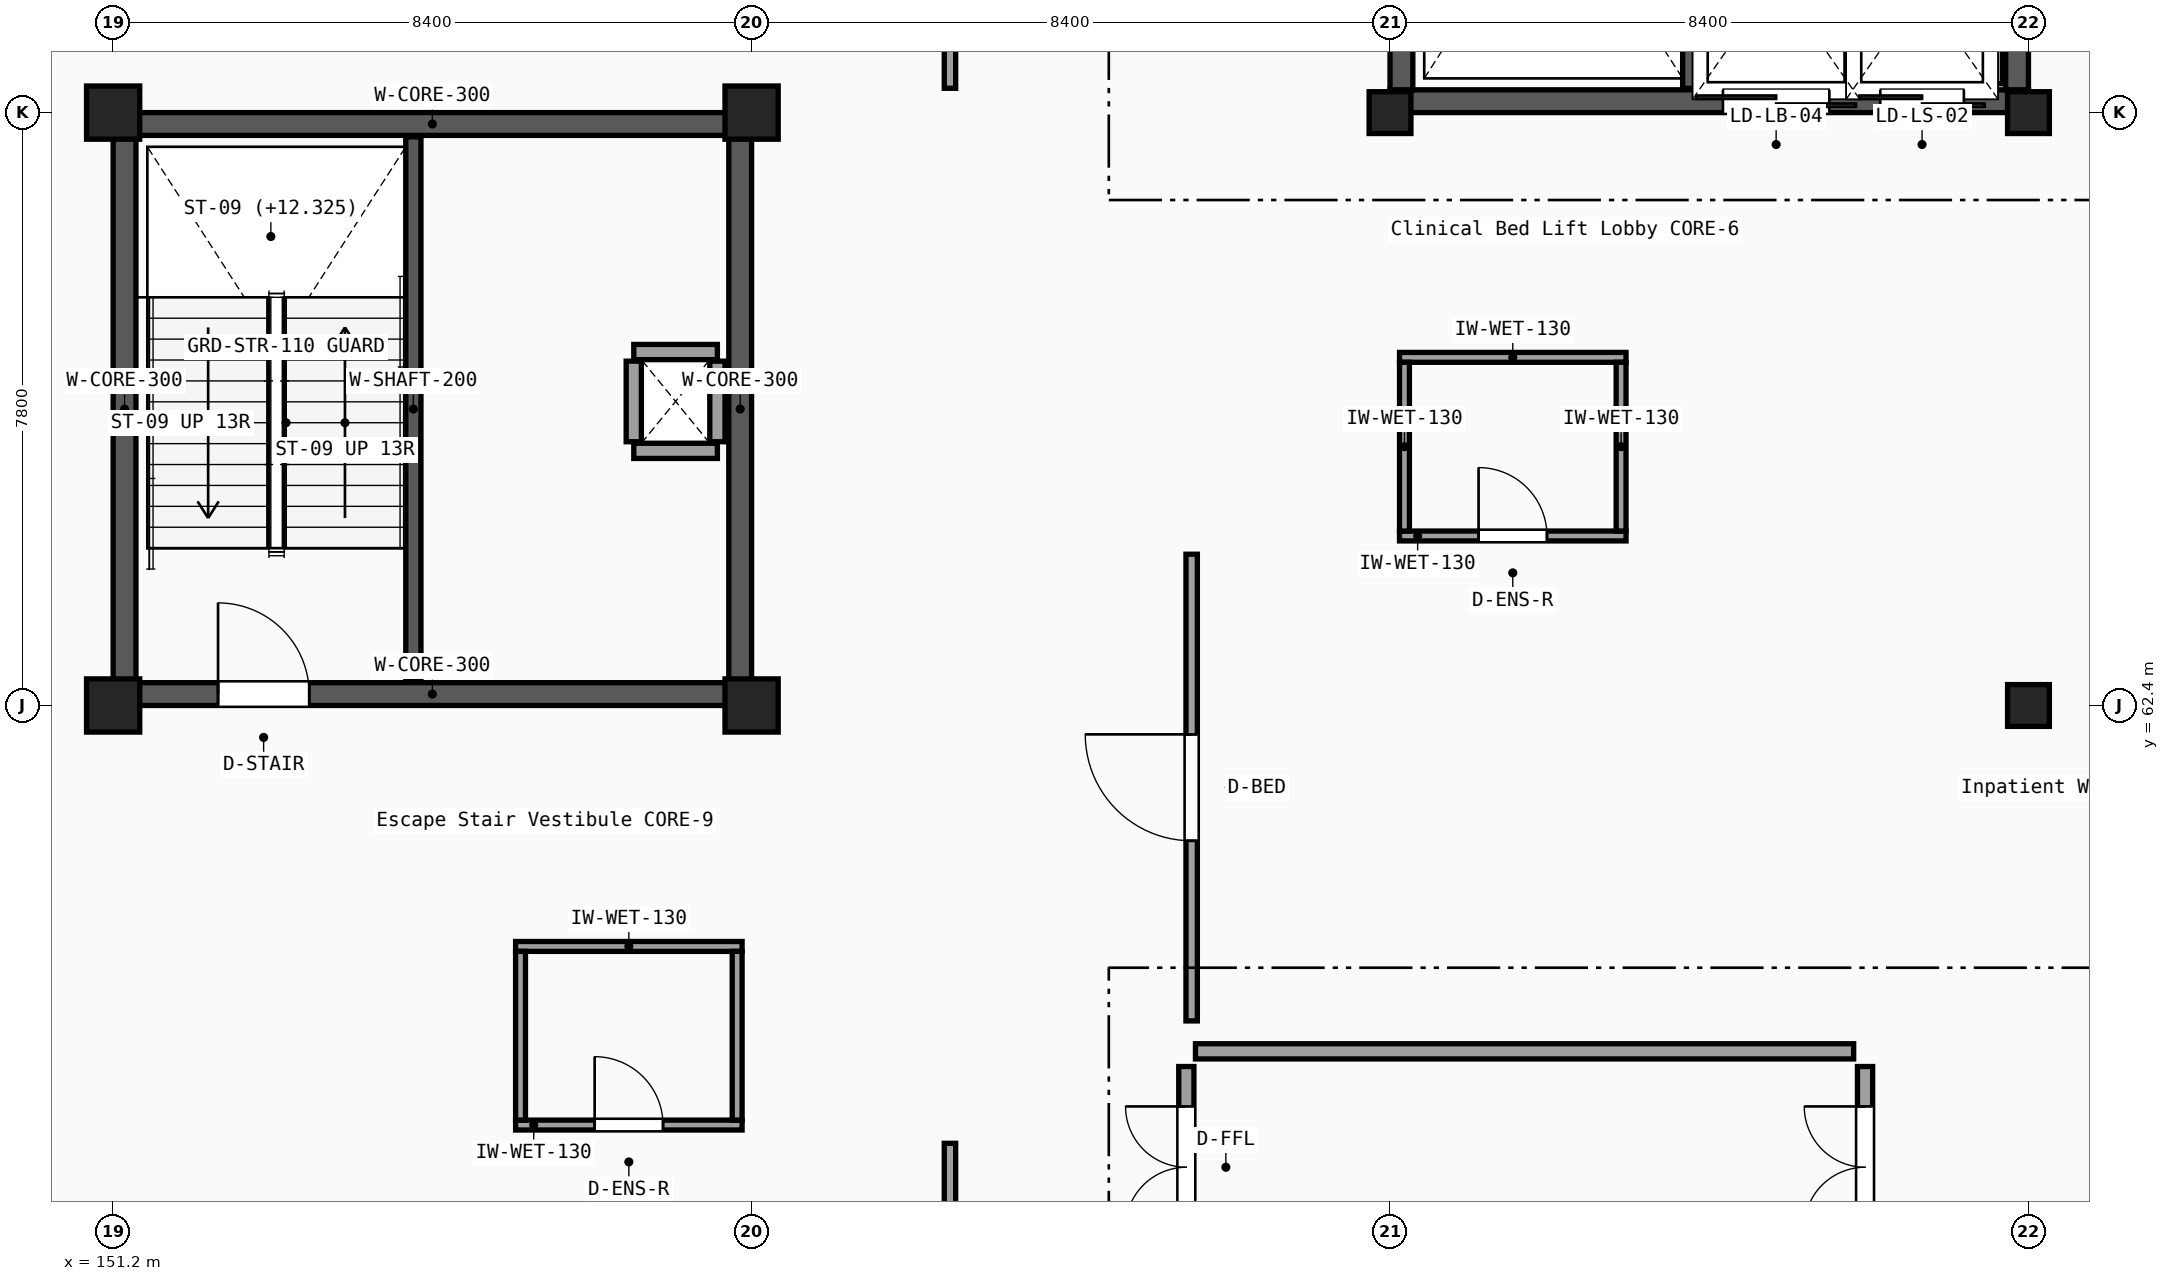
"""IFC4 building model, lengths in metres.
Left out: names, types, materials, properties, quantities, classifications, styles, units other than length and angle.
Written with IfcOpenShell. Run it as: python <this file> out.ifc"""

import sys

from ifc_helpers import new_model, si_unit, direction, frame, frame_2d, origin, origin_2d, place, context, subcontext, project, spatial, rectangle, i_section, extrude, element, fill, save


model = new_model("IFC4")
c1 = context("Model", 3, precision=1e-05, world=origin(), true_north=direction((0.0, 1.0)))
c2 = subcontext(c1, "Body", "Model", "MODEL_VIEW")
j1 = project(units=[si_unit("LENGTHUNIT", "METRE"), si_unit("PLANEANGLEUNIT", "RADIAN")], contexts=[c1])
p1 = place(None, origin())
s1 = spatial("IfcSite", under=j1, at=p1, CompositionType="ELEMENT")
p2 = place(p1, origin())
s2 = spatial("IfcBuilding", under=s1, at=p2, CompositionType="ELEMENT")
p3 = place(p2, frame((0.0, 0.0, 10.2)))
s3 = spatial("IfcBuildingStorey", under=s2, at=p3, CompositionType="ELEMENT", Elevation=10.2)
for number, where, z_axis, x_axis in (
    (1, (151.2, 62.4, 0.0), (0.0, 0.0, 1.0), (1.0, 0.0, 0.0)),
    (2, (151.2, 70.2, 0.0), (0.0, 0.0, 1.0), (1.0, 0.0, 0.0)),
    (3, (159.6, 62.4, 0.0), (0.0, 0.0, 1.0), (1.0, 0.0, 0.0)),
    (4, (159.6, 70.2, 0.0), (0.0, 0.0, 1.0), (1.0, 0.0, 0.0)),
):
    element("IfcColumn", number, at=place(p3, frame(where, z_axis=z_axis, x_axis=x_axis)), inside=s3, PredefinedType="COLUMN", context=c2, shape_type="SweptSolid", body=[
        extrude(rectangle(XDim=0.7, YDim=0.7, at=origin_2d()), origin(), (0.0, 0.0, 1.0), 4.65),
    ])
for number, where, z_axis, x_axis in (
    (5, (168.0, 70.2, 0.0), (0.0, 0.0, 1.0), (1.0, 0.0, 0.0)),
    (6, (176.4, 62.4, 0.0), (0.0, 0.0, 1.0), (1.0, 0.0, 0.0)),
    (7, (176.4, 70.2, 0.0), (0.0, 0.0, 1.0), (1.0, 0.0, 0.0)),
):
    element("IfcColumn", number, at=place(p3, frame(where, z_axis=z_axis, x_axis=x_axis)), inside=s3, PredefinedType="COLUMN", context=c2, shape_type="SweptSolid", body=[
        extrude(i_section(OverallWidth=0.3, OverallDepth=0.55, WebThickness=0.015, FlangeThickness=0.029, FilletRadius=0.027, at=origin_2d()), origin(), (0.0, 0.0, 1.0), 4.65),
    ])
p4 = place(p3, frame((165.44, 57.85, 0.0), z_axis=(0.0, 0.0, 1.0), x_axis=(1.0, 0.0, 0.0)))
e8 = element("IfcWall", 8, at=p4, inside=s3, PredefinedType="PARTITIONING", context=c2, shape_type="SweptSolid", body=[
    extrude(rectangle(XDim=8.66, YDim=0.2, at=frame_2d((4.33, 0.0))), origin(), (0.0, 0.0, 1.0), 3.95),
])
p5 = place(p3, frame((165.32, 55.0, 0.0), z_axis=(0.0, 0.0, 1.0), x_axis=(0.0, 1.0, 0.0)))
e9 = element("IfcWall", 9, at=p5, inside=s3, PredefinedType="PARTITIONING", context=c2, shape_type="SweptSolid", body=[
    extrude(rectangle(XDim=2.65, YDim=0.2, at=frame_2d((1.325, 0.0))), origin(), (0.0, 0.0, 1.0), 3.95),
])
p6 = place(p5, frame((0.525, 0.0, 0.0)))
e10 = element("IfcOpeningElement", 10, at=p6, cuts=e9, PredefinedType="OPENING", context=c2, shape_type="SweptSolid", body=[
    extrude(rectangle(XDim=1.6, YDim=2.2, at=frame_2d((0.8, 1.1))), frame((0.0, 0.11, 0.0), z_axis=(0.0, -1.0, 0.0), x_axis=(1.0, 0.0, 0.0)), (0.0, 0.0, 1.0), 0.22),
])
p7 = place(p3, frame((174.25, 55.0, 0.0), z_axis=(0.0, 0.0, 1.0), x_axis=(0.0, 1.0, 0.0)))
e11 = element("IfcWall", 11, at=p7, inside=s3, PredefinedType="PARTITIONING", context=c2, shape_type="SweptSolid", body=[
    extrude(rectangle(XDim=2.65, YDim=0.2, at=frame_2d((1.325, 0.0))), origin(), (0.0, 0.0, 1.0), 3.95),
])
p8 = place(p7, frame((0.525, 0.0, 0.0)))
e12 = element("IfcOpeningElement", 12, at=p8, cuts=e11, PredefinedType="OPENING", context=c2, shape_type="SweptSolid", body=[
    extrude(rectangle(XDim=1.6, YDim=2.2, at=frame_2d((0.8, 1.1))), frame((0.0, 0.11, 0.0), z_axis=(0.0, -1.0, 0.0), x_axis=(1.0, 0.0, 0.0)), (0.0, 0.0, 1.0), 0.22),
])
p9 = place(p3, frame((168.0, 70.35, 0.0), z_axis=(0.0, 0.0, 1.0), x_axis=(1.0, 0.0, 0.0)))
e13 = element("IfcWall", 13, at=p9, inside=s3, PredefinedType="SHEAR", context=c2, shape_type="SweptSolid", body=[
    extrude(rectangle(XDim=8.4, YDim=0.3, at=frame_2d((4.2, 0.0))), origin(), (0.0, 0.0, 1.0), 4.41),
])
p10 = place(p9, frame((4.38, 0.0, 0.0)))
e14 = element("IfcOpeningElement", 14, at=p10, cuts=e13, PredefinedType="OPENING", context=c2, shape_type="SweptSolid", body=[
    extrude(rectangle(XDim=1.4, YDim=2.2, at=frame_2d((0.7, 1.1))), frame((0.0, 0.16, 0.0), z_axis=(0.0, -1.0, 0.0), x_axis=(1.0, 0.0, 0.0)), (0.0, 0.0, 1.0), 0.32),
])
p11 = place(p9, frame((6.45, 0.0, 0.0)))
e15 = element("IfcOpeningElement", 15, at=p11, cuts=e13, PredefinedType="OPENING", context=c2, shape_type="SweptSolid", body=[
    extrude(rectangle(XDim=1.1, YDim=2.15, at=frame_2d((0.55, 1.075))), frame((0.0, 0.16, 0.0), z_axis=(0.0, -1.0, 0.0), x_axis=(1.0, 0.0, 0.0)), (0.0, 0.0, 1.0), 0.32),
])
for number, where, z_axis, x_axis in (
    (16, (168.15, 70.5, 0.0), (0.0, 0.0, 1.0), (0.0, 1.0, 0.0)),
    (17, (176.25, 70.5, 0.0), (0.0, 0.0, 1.0), (0.0, 1.0, 0.0)),
):
    element("IfcWall", number, at=place(p3, frame(where, z_axis=z_axis, x_axis=x_axis)), inside=s3, PredefinedType="SHEAR", context=c2, shape_type="SweptSolid", body=[
        extrude(rectangle(XDim=7.2, YDim=0.3, at=frame_2d((3.6, 0.0))), origin(), (0.0, 0.0, 1.0), 4.41),
    ])
p12 = place(p3, frame((171.95, 70.52, 0.0), z_axis=(0.0, 0.0, 1.0), x_axis=(0.0, 1.0, 0.0)))
e18 = element("IfcWall", 18, at=p12, inside=s3, PredefinedType="SHEAR", context=c2, shape_type="SweptSolid", body=[
    extrude(rectangle(XDim=7.16, YDim=0.2, at=frame_2d((3.58, 0.0))), origin(), (0.0, 0.0, 1.0), 4.41),
])
p13 = place(p3, frame((174.14, 70.58, 0.0), z_axis=(0.0, 0.0, 1.0), x_axis=(0.0, 1.0, 0.0)))
e19 = element("IfcWall", 19, at=p13, inside=s3, PredefinedType="PARTITIONING", context=c2, shape_type="SweptSolid", body=[
    extrude(rectangle(XDim=2.74, YDim=0.2, at=frame_2d((1.37, 0.0))), origin(), (0.0, 0.0, 1.0), 3.95),
])
p14 = place(p3, frame((175.96, 70.58, 0.0), z_axis=(0.0, 0.0, 1.0), x_axis=(0.0, 1.0, 0.0)))
e20 = element("IfcWall", 20, at=p14, inside=s3, PredefinedType="PARTITIONING", context=c2, shape_type="SweptSolid", body=[
    extrude(rectangle(XDim=2.44, YDim=0.2, at=frame_2d((1.22, 0.0))), origin(), (0.0, 0.0, 1.0), 3.95),
])
p15 = place(p3, frame((151.2, 62.55, 0.0), z_axis=(0.0, 0.0, 1.0), x_axis=(1.0, 0.0, 0.0)))
e21 = element("IfcWall", 21, at=p15, inside=s3, PredefinedType="SHEAR", context=c2, shape_type="SweptSolid", body=[
    extrude(rectangle(XDim=8.4, YDim=0.3, at=frame_2d((4.2, 0.0))), origin(), (0.0, 0.0, 1.0), 4.41),
])
p16 = place(p15, frame((1.38, 0.0, 0.0)))
e22 = element("IfcOpeningElement", 22, at=p16, cuts=e21, PredefinedType="OPENING", context=c2, shape_type="SweptSolid", body=[
    extrude(rectangle(XDim=1.2, YDim=2.15, at=frame_2d((0.6, 1.075))), frame((0.0, 0.16, 0.0), z_axis=(0.0, -1.0, 0.0), x_axis=(1.0, 0.0, 0.0)), (0.0, 0.0, 1.0), 0.32),
])
p17 = place(p3, frame((151.2, 70.05, 0.0), z_axis=(0.0, 0.0, 1.0), x_axis=(1.0, 0.0, 0.0)))
e23 = element("IfcWall", 23, at=p17, inside=s3, PredefinedType="SHEAR", context=c2, shape_type="SweptSolid", body=[
    extrude(rectangle(XDim=8.4, YDim=0.3, at=frame_2d((4.2, 0.0))), origin(), (0.0, 0.0, 1.0), 4.41),
])
for number, where, z_axis, x_axis in (
    (24, (151.35, 62.7, 0.0), (0.0, 0.0, 1.0), (0.0, 1.0, 0.0)),
    (25, (159.45, 62.7, 0.0), (0.0, 0.0, 1.0), (0.0, 1.0, 0.0)),
):
    element("IfcWall", number, at=place(p3, frame(where, z_axis=z_axis, x_axis=x_axis)), inside=s3, PredefinedType="SHEAR", context=c2, shape_type="SweptSolid", body=[
        extrude(rectangle(XDim=7.2, YDim=0.3, at=frame_2d((3.6, 0.0))), origin(), (0.0, 0.0, 1.0), 4.41),
    ])
p18 = place(p3, frame((155.15, 62.72, 0.0), z_axis=(0.0, 0.0, 1.0), x_axis=(0.0, 1.0, 0.0)))
e26 = element("IfcWall", 26, at=p18, inside=s3, PredefinedType="SHEAR", context=c2, shape_type="SweptSolid", body=[
    extrude(rectangle(XDim=7.16, YDim=0.2, at=frame_2d((3.58, 0.0))), origin(), (0.0, 0.0, 1.0), 4.41),
])
for number, where, z_axis, x_axis in (
    (27, (158.05, 65.75, 0.0), (0.0, 0.0, 1.0), (1.0, 0.0, 0.0)),
    (28, (158.05, 67.05, 0.0), (0.0, 0.0, 1.0), (1.0, 0.0, 0.0)),
):
    element("IfcWall", number, at=place(p3, frame(where, z_axis=z_axis, x_axis=x_axis)), inside=s3, PredefinedType="PARTITIONING", context=c2, shape_type="SweptSolid", body=[
        extrude(rectangle(XDim=1.1, YDim=0.2, at=frame_2d((0.55, 0.0))), origin(), (0.0, 0.0, 1.0), 3.95),
    ])
for number, where, z_axis, x_axis in (
    (29, (158.05, 65.87, 0.0), (0.0, 0.0, 1.0), (0.0, 1.0, 0.0)),
    (30, (159.15, 65.87, 0.0), (0.0, 0.0, 1.0), (0.0, 1.0, 0.0)),
):
    element("IfcWall", number, at=place(p3, frame(where, z_axis=z_axis, x_axis=x_axis)), inside=s3, PredefinedType="PARTITIONING", context=c2, shape_type="SweptSolid", body=[
        extrude(rectangle(XDim=1.06, YDim=0.2, at=frame_2d((0.53, 0.0))), origin(), (0.0, 0.0, 1.0), 3.95),
    ])
p19 = place(p3, frame((162.21, 47.42, 0.0), z_axis=(0.0, 0.0, 1.0), x_axis=(0.0, 1.0, 0.0)))
e31 = element("IfcWall", 31, at=p19, inside=s3, PredefinedType="PARTITIONING", context=c2, shape_type="SweptSolid", body=[
    extrude(rectangle(XDim=9.22, YDim=0.15, at=frame_2d((4.61, 0.0))), origin(), (0.0, 0.0, 1.0), 3.95),
])
p20 = place(p19, frame((3.91, 0.0, 0.0)))
e32 = element("IfcOpeningElement", 32, at=p20, cuts=e31, PredefinedType="OPENING", context=c2, shape_type="SweptSolid", body=[
    extrude(rectangle(XDim=1.4, YDim=2.2, at=frame_2d((0.7, 1.1))), frame((0.0, 0.085, 0.0), z_axis=(0.0, -1.0, 0.0), x_axis=(1.0, 0.0, 0.0)), (0.0, 0.0, 1.0), 0.17),
])
p21 = place(p3, frame((156.495, 56.88, 0.0), z_axis=(0.0, 0.0, 1.0), x_axis=(1.0, 0.0, 0.0)))
e33 = element("IfcWall", 33, at=p21, inside=s3, PredefinedType="PARTITIONING", context=c2, shape_type="SweptSolid", body=[
    extrude(rectangle(XDim=2.98, YDim=0.13, at=frame_2d((1.49, 0.0))), origin(), (0.0, 0.0, 1.0), 4.08),
])
p22 = place(p21, frame((1.04, 0.0, 0.0)))
e34 = element("IfcOpeningElement", 34, at=p22, cuts=e33, PredefinedType="OPENING", context=c2, shape_type="SweptSolid", body=[
    extrude(rectangle(XDim=0.9, YDim=2.1, at=frame_2d((0.45, 1.05))), frame((0.0, 0.075, 0.0), z_axis=(0.0, -1.0, 0.0), x_axis=(1.0, 0.0, 0.0)), (0.0, 0.0, 1.0), 0.15),
])
p23 = place(p3, frame((156.495, 59.23, 0.0), z_axis=(0.0, 0.0, 1.0), x_axis=(1.0, 0.0, 0.0)))
e35 = element("IfcWall", 35, at=p23, inside=s3, PredefinedType="PARTITIONING", context=c2, shape_type="SweptSolid", body=[
    extrude(rectangle(XDim=2.98, YDim=0.13, at=frame_2d((1.49, 0.0))), origin(), (0.0, 0.0, 1.0), 4.08),
])
p24 = place(p3, frame((156.56, 56.945, 0.0), z_axis=(0.0, 0.0, 1.0), x_axis=(0.0, 1.0, 0.0)))
e36 = element("IfcWall", 36, at=p24, inside=s3, PredefinedType="PARTITIONING", context=c2, shape_type="SweptSolid", body=[
    extrude(rectangle(XDim=2.22, YDim=0.13, at=frame_2d((1.11, 0.0))), origin(), (0.0, 0.0, 1.0), 4.37),
])
p25 = place(p3, frame((159.41, 56.945, 0.0), z_axis=(0.0, 0.0, 1.0), x_axis=(0.0, 1.0, 0.0)))
e37 = element("IfcWall", 37, at=p25, inside=s3, PredefinedType="PARTITIONING", context=c2, shape_type="SweptSolid", body=[
    extrude(rectangle(XDim=2.22, YDim=0.13, at=frame_2d((1.11, 0.0))), origin(), (0.0, 0.0, 1.0), 4.08),
])
p26 = place(p3, frame((162.21, 70.52, 0.0), z_axis=(0.0, 0.0, 1.0), x_axis=(0.0, 1.0, 0.0)))
e38 = element("IfcWall", 38, at=p26, inside=s3, PredefinedType="PARTITIONING", context=c2, shape_type="SweptSolid", body=[
    extrude(rectangle(XDim=8.56, YDim=0.15, at=frame_2d((4.28, 0.0))), origin(), (0.0, 0.0, 1.0), 3.95),
])
p27 = place(p26, frame((3.58, 0.0, 0.0)))
e39 = element("IfcOpeningElement", 39, at=p27, cuts=e38, PredefinedType="OPENING", context=c2, shape_type="SweptSolid", body=[
    extrude(rectangle(XDim=1.4, YDim=2.2, at=frame_2d((0.7, 1.1))), frame((0.0, 0.085, 0.0), z_axis=(0.0, -1.0, 0.0), x_axis=(1.0, 0.0, 0.0)), (0.0, 0.0, 1.0), 0.17),
])
p28 = place(p3, frame((165.39, 58.25, 0.0), z_axis=(0.0, 0.0, 1.0), x_axis=(0.0, 1.0, 0.0)))
e40 = element("IfcWall", 40, at=p28, inside=s3, PredefinedType="PARTITIONING", context=c2, shape_type="SweptSolid", body=[
    extrude(rectangle(XDim=6.14, YDim=0.15, at=frame_2d((3.07, 0.0))), origin(), (0.0, 0.0, 1.0), 3.95),
])
p29 = place(p28, frame((2.37, 0.0, 0.0)))
e41 = element("IfcOpeningElement", 41, at=p29, cuts=e40, PredefinedType="OPENING", context=c2, shape_type="SweptSolid", body=[
    extrude(rectangle(XDim=1.4, YDim=2.2, at=frame_2d((0.7, 1.1))), frame((0.0, 0.085, 0.0), z_axis=(0.0, -1.0, 0.0), x_axis=(1.0, 0.0, 0.0)), (0.0, 0.0, 1.0), 0.17),
])
p30 = place(p3, frame((168.125, 64.63, 0.0), z_axis=(0.0, 0.0, 1.0), x_axis=(1.0, 0.0, 0.0)))
e42 = element("IfcWall", 42, at=p30, inside=s3, PredefinedType="PARTITIONING", context=c2, shape_type="SweptSolid", body=[
    extrude(rectangle(XDim=2.98, YDim=0.13, at=frame_2d((1.49, 0.0))), origin(), (0.0, 0.0, 1.0), 4.08),
])
p31 = place(p30, frame((1.04, 0.0, 0.0)))
e43 = element("IfcOpeningElement", 43, at=p31, cuts=e42, PredefinedType="OPENING", context=c2, shape_type="SweptSolid", body=[
    extrude(rectangle(XDim=0.9, YDim=2.1, at=frame_2d((0.45, 1.05))), frame((0.0, 0.075, 0.0), z_axis=(0.0, -1.0, 0.0), x_axis=(1.0, 0.0, 0.0)), (0.0, 0.0, 1.0), 0.15),
])
p32 = place(p3, frame((168.125, 66.98, 0.0), z_axis=(0.0, 0.0, 1.0), x_axis=(1.0, 0.0, 0.0)))
e44 = element("IfcWall", 44, at=p32, inside=s3, PredefinedType="PARTITIONING", context=c2, shape_type="SweptSolid", body=[
    extrude(rectangle(XDim=2.98, YDim=0.13, at=frame_2d((1.49, 0.0))), origin(), (0.0, 0.0, 1.0), 4.08),
])
p33 = place(p3, frame((168.19, 64.695, 0.0), z_axis=(0.0, 0.0, 1.0), x_axis=(0.0, 1.0, 0.0)))
e45 = element("IfcWall", 45, at=p33, inside=s3, PredefinedType="PARTITIONING", context=c2, shape_type="SweptSolid", body=[
    extrude(rectangle(XDim=2.22, YDim=0.13, at=frame_2d((1.11, 0.0))), origin(), (0.0, 0.0, 1.0), 4.08),
])
p34 = place(p3, frame((171.04, 64.695, 0.0), z_axis=(0.0, 0.0, 1.0), x_axis=(0.0, 1.0, 0.0)))
e46 = element("IfcWall", 46, at=p34, inside=s3, PredefinedType="PARTITIONING", context=c2, shape_type="SweptSolid", body=[
    extrude(rectangle(XDim=2.22, YDim=0.13, at=frame_2d((1.11, 0.0))), origin(), (0.0, 0.0, 1.0), 4.37),
])
p35 = place(p6, origin())
e47 = element("IfcDoor", 47, at=p35, inside=s3, OperationType="DOUBLE_DOOR_SINGLE_SWING", PredefinedType="DOOR", context=c2, shape_type="SweptSolid", body=[
    extrude(rectangle(XDim=1.6, YDim=2.2, at=frame_2d((0.8, 1.1))), frame((0.0, 0.025, 0.0), z_axis=(0.0, -1.0, 0.0), x_axis=(1.0, 0.0, 0.0)), (0.0, 0.0, 1.0), 0.05),
])
fill(e10, e47)
p36 = place(p8, origin())
e48 = element("IfcDoor", 48, at=p36, inside=s3, OperationType="DOUBLE_DOOR_SINGLE_SWING", PredefinedType="DOOR", context=c2, shape_type="SweptSolid", body=[
    extrude(rectangle(XDim=1.6, YDim=2.2, at=frame_2d((0.8, 1.1))), frame((0.0, 0.025, 0.0), z_axis=(0.0, -1.0, 0.0), x_axis=(1.0, 0.0, 0.0)), (0.0, 0.0, 1.0), 0.05),
])
fill(e12, e48)
p37 = place(p10, origin())
e49 = element("IfcDoor", 49, at=p37, inside=s3, OperationType="DOUBLE_DOOR_SLIDING", PredefinedType="DOOR", context=c2, shape_type="SweptSolid", body=[
    extrude(rectangle(XDim=1.4, YDim=2.2, at=frame_2d((0.7, 1.1))), frame((0.0, 0.025, 0.0), z_axis=(0.0, -1.0, 0.0), x_axis=(1.0, 0.0, 0.0)), (0.0, 0.0, 1.0), 0.05),
])
fill(e14, e49)
p38 = place(p11, origin())
e50 = element("IfcDoor", 50, at=p38, inside=s3, OperationType="DOUBLE_DOOR_SLIDING", PredefinedType="DOOR", context=c2, shape_type="SweptSolid", body=[
    extrude(rectangle(XDim=1.1, YDim=2.15, at=frame_2d((0.55, 1.075))), frame((0.0, 0.025, 0.0), z_axis=(0.0, -1.0, 0.0), x_axis=(1.0, 0.0, 0.0)), (0.0, 0.0, 1.0), 0.05),
])
fill(e15, e50)
p39 = place(p16, origin())
e51 = element("IfcDoor", 51, at=p39, inside=s3, OperationType="SINGLE_SWING_LEFT", PredefinedType="DOOR", context=c2, shape_type="SweptSolid", body=[
    extrude(rectangle(XDim=1.2, YDim=2.15, at=frame_2d((0.6, 1.075))), frame((0.0, 0.025, 0.0), z_axis=(0.0, -1.0, 0.0), x_axis=(1.0, 0.0, 0.0)), (0.0, 0.0, 1.0), 0.05),
])
fill(e22, e51)
p40 = place(p22, origin())
e52 = element("IfcDoor", 52, at=p40, inside=s3, OperationType="SINGLE_SWING_LEFT", PredefinedType="DOOR", context=c2, shape_type="SweptSolid", body=[
    extrude(rectangle(XDim=0.9, YDim=2.1, at=frame_2d((0.45, 1.05))), frame((0.0, 0.025, 0.0), z_axis=(0.0, -1.0, 0.0), x_axis=(1.0, 0.0, 0.0)), (0.0, 0.0, 1.0), 0.05),
])
fill(e34, e52)
p41 = place(p29, origin())
e53 = element("IfcDoor", 53, at=p41, inside=s3, OperationType="SINGLE_SWING_RIGHT", PredefinedType="DOOR", context=c2, shape_type="SweptSolid", body=[
    extrude(rectangle(XDim=1.4, YDim=2.2, at=frame_2d((0.7, 1.1))), frame((0.0, 0.025, 0.0), z_axis=(0.0, -1.0, 0.0), x_axis=(1.0, 0.0, 0.0)), (0.0, 0.0, 1.0), 0.05),
])
fill(e41, e53)
p42 = place(p31, origin())
e54 = element("IfcDoor", 54, at=p42, inside=s3, OperationType="SINGLE_SWING_LEFT", PredefinedType="DOOR", context=c2, shape_type="SweptSolid", body=[
    extrude(rectangle(XDim=0.9, YDim=2.1, at=frame_2d((0.45, 1.05))), frame((0.0, 0.025, 0.0), z_axis=(0.0, -1.0, 0.0), x_axis=(1.0, 0.0, 0.0)), (0.0, 0.0, 1.0), 0.05),
])
fill(e43, e54)
save(model, sys.argv[1])
